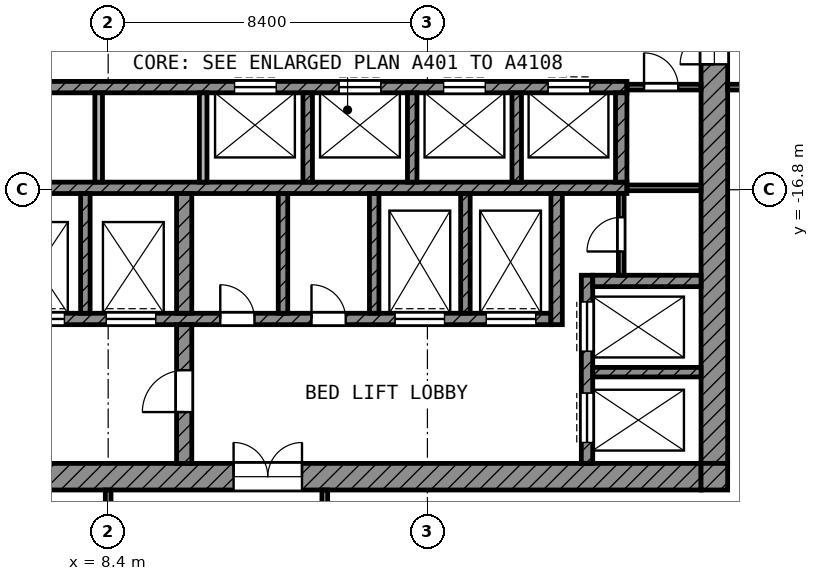
"""IFC4 building model, lengths in metres.
Left out: names, types, materials, properties, quantities, classifications, styles, units other than length and angle.
Written with IfcOpenShell. Run it as: python <this file> out.ifc"""

import sys

from ifc_helpers import new_model, si_unit, direction, frame, frame_2d, origin, place, context, subcontext, project, spatial, rectangle, extrude, element, fill, save


model = new_model("IFC4")
c1 = context("Model", 3, precision=1e-05, world=origin(), true_north=direction((0.0, 1.0)))
c2 = subcontext(c1, "Body", "Model", "MODEL_VIEW")
j1 = project(units=[si_unit("LENGTHUNIT", "METRE"), si_unit("PLANEANGLEUNIT", "RADIAN")], contexts=[c1])
p1 = place(None, origin())
s1 = spatial("IfcSite", under=j1, at=p1, CompositionType="ELEMENT")
p2 = place(p1, origin())
s2 = spatial("IfcBuilding", under=s1, at=p2, CompositionType="ELEMENT")
p3 = place(p2, frame((0.0, 0.0, 281.8)))
s3 = spatial("IfcBuildingStorey", under=s2, at=p3, CompositionType="ELEMENT", Elevation=281.8)
p4 = place(p3, frame((24.35, -24.0, 0.0), z_axis=(0.0, 0.0, 1.0), x_axis=(0.0, 1.0, 0.0)))
e1 = element("IfcWall", 1, at=p4, inside=s3, PredefinedType="SHEAR", context=c2, shape_type="SweptSolid", body=[
    extrude(rectangle(XDim=18.6, YDim=0.7, at=frame_2d((9.3, 0.0))), origin(), (0.0, 0.0, 1.0), 3.6),
])
p5 = place(p4, frame((10.5, 0.0, 0.0)))
e2 = element("IfcOpeningElement", 2, at=p5, cuts=e1, PredefinedType="OPENING", context=c2, shape_type="SweptSolid", body=[
    extrude(rectangle(XDim=1.8, YDim=2.1, at=frame_2d((0.9, 1.05))), frame((0.0, 0.36, 0.0), z_axis=(0.0, -1.0, 0.0), x_axis=(1.0, 0.0, 0.0)), (0.0, 0.0, 1.0), 0.72),
])
p6 = place(p3, frame((5.4, -24.35, 0.0), z_axis=(0.0, 0.0, 1.0), x_axis=(1.0, 0.0, 0.0)))
e3 = element("IfcWall", 3, at=p6, inside=s3, PredefinedType="SHEAR", context=c2, shape_type="SweptSolid", body=[
    extrude(rectangle(XDim=18.6, YDim=0.7, at=frame_2d((9.3, 0.0))), origin(), (0.0, 0.0, 1.0), 3.6),
])
p7 = place(p6, frame((6.3, 0.0, 0.0)))
e4 = element("IfcOpeningElement", 4, at=p7, cuts=e3, PredefinedType="OPENING", context=c2, shape_type="SweptSolid", body=[
    extrude(rectangle(XDim=1.8, YDim=2.1, at=frame_2d((0.9, 1.05))), frame((0.0, 0.36, 0.0), z_axis=(0.0, -1.0, 0.0), x_axis=(1.0, 0.0, 0.0)), (0.0, 0.0, 1.0), 0.72),
])
p8 = place(p3, frame((24.35, -24.7, 0.0), z_axis=(0.0, 0.0, 1.0), x_axis=(0.0, 1.0, 0.0)))
e5 = element("IfcWall", 5, at=p8, inside=s3, PredefinedType="SHEAR", context=c2, shape_type="SweptSolid", body=[
    extrude(rectangle(XDim=0.7, YDim=0.7, at=frame_2d((0.35, 0.0))), origin(), (0.0, 0.0, 1.0), 3.6),
])
p9 = place(p3, frame((5.4, -14.1, 0.0), z_axis=(0.0, 0.0, 1.0), x_axis=(1.0, 0.0, 0.0)))
e6 = element("IfcWall", 6, at=p9, inside=s3, PredefinedType="SHEAR", context=c2, shape_type="SweptSolid", body=[
    extrude(rectangle(XDim=16.65, YDim=0.3, at=frame_2d((8.325, 0.0))), origin(), (0.0, 0.0, 1.0), 3.6),
])
p10 = place(p9, frame((6.325, 0.0, 0.0)))
e7 = element("IfcOpeningElement", 7, at=p10, cuts=e6, PredefinedType="OPENING", context=c2, shape_type="SweptSolid", body=[
    extrude(rectangle(XDim=1.1, YDim=2.1, at=frame_2d((0.55, 1.05))), frame((0.0, 0.16, 0.0), z_axis=(0.0, -1.0, 0.0), x_axis=(1.0, 0.0, 0.0)), (0.0, 0.0, 1.0), 0.32),
])
p11 = place(p9, frame((9.075, 0.0, 0.0)))
e8 = element("IfcOpeningElement", 8, at=p11, cuts=e6, PredefinedType="OPENING", context=c2, shape_type="SweptSolid", body=[
    extrude(rectangle(XDim=1.1, YDim=2.1, at=frame_2d((0.55, 1.05))), frame((0.0, 0.16, 0.0), z_axis=(0.0, -1.0, 0.0), x_axis=(1.0, 0.0, 0.0)), (0.0, 0.0, 1.0), 0.32),
])
p12 = place(p9, frame((11.825, 0.0, 0.0)))
e9 = element("IfcOpeningElement", 9, at=p12, cuts=e6, PredefinedType="OPENING", context=c2, shape_type="SweptSolid", body=[
    extrude(rectangle(XDim=1.1, YDim=2.1, at=frame_2d((0.55, 1.05))), frame((0.0, 0.16, 0.0), z_axis=(0.0, -1.0, 0.0), x_axis=(1.0, 0.0, 0.0)), (0.0, 0.0, 1.0), 0.32),
])
p13 = place(p9, frame((14.575, 0.0, 0.0)))
e10 = element("IfcOpeningElement", 10, at=p13, cuts=e6, PredefinedType="OPENING", context=c2, shape_type="SweptSolid", body=[
    extrude(rectangle(XDim=1.1, YDim=2.1, at=frame_2d((0.55, 1.05))), frame((0.0, 0.16, 0.0), z_axis=(0.0, -1.0, 0.0), x_axis=(1.0, 0.0, 0.0)), (0.0, 0.0, 1.0), 0.32),
])
p14 = place(p3, frame((5.4, -16.75, 0.0), z_axis=(0.0, 0.0, 1.0), x_axis=(1.0, 0.0, 0.0)))
e11 = element("IfcWall", 11, at=p14, inside=s3, PredefinedType="SHEAR", context=c2, shape_type="SweptSolid", body=[
    extrude(rectangle(XDim=16.65, YDim=0.3, at=frame_2d((8.325, 0.0))), origin(), (0.0, 0.0, 1.0), 3.6),
])
p15 = place(p3, frame((5.4, -20.2, 0.0), z_axis=(0.0, 0.0, 1.0), x_axis=(1.0, 0.0, 0.0)))
e12 = element("IfcWall", 12, at=p15, inside=s3, PredefinedType="SHEAR", context=c2, shape_type="SweptSolid", body=[
    extrude(rectangle(XDim=14.65, YDim=0.3, at=frame_2d((7.325, 0.0))), origin(), (0.0, 0.0, 1.0), 3.6),
])
p16 = place(p15, frame((10.55, 0.0, 0.0)))
e13 = element("IfcOpeningElement", 13, at=p16, cuts=e12, PredefinedType="OPENING", context=c2, shape_type="SweptSolid", body=[
    extrude(rectangle(XDim=1.3, YDim=2.1, at=frame_2d((0.65, 1.05))), frame((0.0, 0.16, 0.0), z_axis=(0.0, -1.0, 0.0), x_axis=(1.0, 0.0, 0.0)), (0.0, 0.0, 1.0), 0.32),
])
p17 = place(p15, frame((12.95, 0.0, 0.0)))
e14 = element("IfcOpeningElement", 14, at=p17, cuts=e12, PredefinedType="OPENING", context=c2, shape_type="SweptSolid", body=[
    extrude(rectangle(XDim=1.3, YDim=2.1, at=frame_2d((0.65, 1.05))), frame((0.0, 0.16, 0.0), z_axis=(0.0, -1.0, 0.0), x_axis=(1.0, 0.0, 0.0)), (0.0, 0.0, 1.0), 0.32),
])
p18 = place(p15, frame((0.55, 0.0, 0.0)))
e15 = element("IfcOpeningElement", 15, at=p18, cuts=e12, PredefinedType="OPENING", context=c2, shape_type="SweptSolid", body=[
    extrude(rectangle(XDim=1.3, YDim=2.1, at=frame_2d((0.65, 1.05))), frame((0.0, 0.16, 0.0), z_axis=(0.0, -1.0, 0.0), x_axis=(1.0, 0.0, 0.0)), (0.0, 0.0, 1.0), 0.32),
])
p19 = place(p15, frame((2.95, 0.0, 0.0)))
e16 = element("IfcOpeningElement", 16, at=p19, cuts=e12, PredefinedType="OPENING", context=c2, shape_type="SweptSolid", body=[
    extrude(rectangle(XDim=1.3, YDim=2.1, at=frame_2d((0.65, 1.05))), frame((0.0, 0.16, 0.0), z_axis=(0.0, -1.0, 0.0), x_axis=(1.0, 0.0, 0.0)), (0.0, 0.0, 1.0), 0.32),
])
p20 = place(p15, frame((5.95, 0.0, 0.0)))
e17 = element("IfcOpeningElement", 17, at=p20, cuts=e12, PredefinedType="OPENING", context=c2, shape_type="SweptSolid", body=[
    extrude(rectangle(XDim=0.9, YDim=2.1, at=frame_2d((0.45, 1.05))), frame((0.0, 0.16, 0.0), z_axis=(0.0, -1.0, 0.0), x_axis=(1.0, 0.0, 0.0)), (0.0, 0.0, 1.0), 0.32),
])
p21 = place(p15, frame((8.35, 0.0, 0.0)))
e18 = element("IfcOpeningElement", 18, at=p21, cuts=e12, PredefinedType="OPENING", context=c2, shape_type="SweptSolid", body=[
    extrude(rectangle(XDim=0.9, YDim=2.1, at=frame_2d((0.45, 1.05))), frame((0.0, 0.16, 0.0), z_axis=(0.0, -1.0, 0.0), x_axis=(1.0, 0.0, 0.0)), (0.0, 0.0, 1.0), 0.32),
])
p22 = place(p3, frame((10.4, -24.0, 0.0), z_axis=(0.0, 0.0, 1.0), x_axis=(0.0, 1.0, 0.0)))
e19 = element("IfcWall", 19, at=p22, inside=s3, PredefinedType="SHEAR", context=c2, shape_type="SweptSolid", body=[
    extrude(rectangle(XDim=3.65, YDim=0.4, at=frame_2d((1.825, 0.0))), origin(), (0.0, 0.0, 1.0), 3.6),
])
p23 = place(p22, frame((1.35, 0.0, 0.0)))
e20 = element("IfcOpeningElement", 20, at=p23, cuts=e19, PredefinedType="OPENING", context=c2, shape_type="SweptSolid", body=[
    extrude(rectangle(XDim=1.1, YDim=2.1, at=frame_2d((0.55, 1.05))), frame((0.0, 0.21, 0.0), z_axis=(0.0, -1.0, 0.0), x_axis=(1.0, 0.0, 0.0)), (0.0, 0.0, 1.0), 0.42),
])
p24 = place(p3, frame((10.4, -20.05, 0.0), z_axis=(0.0, 0.0, 1.0), x_axis=(0.0, 1.0, 0.0)))
e21 = element("IfcWall", 21, at=p24, inside=s3, PredefinedType="SHEAR", context=c2, shape_type="SweptSolid", body=[
    extrude(rectangle(XDim=3.15, YDim=0.4, at=frame_2d((1.575, 0.0))), origin(), (0.0, 0.0, 1.0), 3.6),
])
p25 = place(p3, frame((20.2, -20.35, 0.0), z_axis=(0.0, 0.0, 1.0), x_axis=(0.0, 1.0, 0.0)))
e22 = element("IfcWall", 22, at=p25, inside=s3, PredefinedType="SHEAR", context=c2, shape_type="SweptSolid", body=[
    extrude(rectangle(XDim=3.45, YDim=0.3, at=frame_2d((1.725, 0.0))), origin(), (0.0, 0.0, 1.0), 3.6),
])
p26 = place(p3, frame((21.9, -16.6, 0.0), z_axis=(0.0, 0.0, 1.0), x_axis=(0.0, 1.0, 0.0)))
e23 = element("IfcWall", 23, at=p26, inside=s3, PredefinedType="SHEAR", context=c2, shape_type="SweptSolid", body=[
    extrude(rectangle(XDim=2.35, YDim=0.3, at=frame_2d((1.175, 0.0))), origin(), (0.0, 0.0, 1.0), 3.6),
])
p27 = place(p3, frame((21.15, -19.2, 0.0), z_axis=(0.0, 0.0, 1.0), x_axis=(1.0, 0.0, 0.0)))
e24 = element("IfcWall", 24, at=p27, inside=s3, PredefinedType="SHEAR", context=c2, shape_type="SweptSolid", body=[
    extrude(rectangle(XDim=2.85, YDim=0.3, at=frame_2d((1.425, 0.0))), origin(), (0.0, 0.0, 1.0), 3.6),
])
p28 = place(p3, frame((21.0, -24.0, 0.0), z_axis=(0.0, 0.0, 1.0), x_axis=(0.0, 1.0, 0.0)))
e25 = element("IfcWall", 25, at=p28, inside=s3, PredefinedType="SHEAR", context=c2, shape_type="SweptSolid", body=[
    extrude(rectangle(XDim=4.95, YDim=0.3, at=frame_2d((2.475, 0.0))), origin(), (0.0, 0.0, 1.0), 3.6),
])
p29 = place(p28, frame((2.95, 0.0, 0.0)))
e26 = element("IfcOpeningElement", 26, at=p29, cuts=e25, PredefinedType="OPENING", context=c2, shape_type="SweptSolid", body=[
    extrude(rectangle(XDim=1.3, YDim=2.1, at=frame_2d((0.65, 1.05))), frame((0.0, 0.16, 0.0), z_axis=(0.0, -1.0, 0.0), x_axis=(1.0, 0.0, 0.0)), (0.0, 0.0, 1.0), 0.32),
])
p30 = place(p28, frame((0.55, 0.0, 0.0)))
e27 = element("IfcOpeningElement", 27, at=p30, cuts=e25, PredefinedType="OPENING", context=c2, shape_type="SweptSolid", body=[
    extrude(rectangle(XDim=1.3, YDim=2.1, at=frame_2d((0.65, 1.05))), frame((0.0, 0.16, 0.0), z_axis=(0.0, -1.0, 0.0), x_axis=(1.0, 0.0, 0.0)), (0.0, 0.0, 1.0), 0.32),
])
p31 = place(p3, frame((21.15, -21.6, 0.0), z_axis=(0.0, 0.0, 1.0), x_axis=(1.0, 0.0, 0.0)))
e28 = element("IfcWall", 28, at=p31, inside=s3, PredefinedType="SHEAR", context=c2, shape_type="SweptSolid", body=[
    extrude(rectangle(XDim=2.85, YDim=0.25, at=frame_2d((1.425, 0.0))), origin(), (0.0, 0.0, 1.0), 3.6),
])
for number, where, z_axis, x_axis in (
    (29, (7.8, -20.05, 0.0), (0.0, 0.0, 1.0), (0.0, 1.0, 0.0)),
    (30, (13.0, -20.05, 0.0), (0.0, 0.0, 1.0), (0.0, 1.0, 0.0)),
    (31, (15.4, -20.05, 0.0), (0.0, 0.0, 1.0), (0.0, 1.0, 0.0)),
    (32, (17.8, -20.05, 0.0), (0.0, 0.0, 1.0), (0.0, 1.0, 0.0)),
):
    element("IfcWall", number, at=place(p3, frame(where, z_axis=z_axis, x_axis=x_axis)), inside=s3, PredefinedType="SHEAR", context=c2, shape_type="SweptSolid", body=[
        extrude(rectangle(XDim=3.15, YDim=0.25, at=frame_2d((1.575, 0.0))), origin(), (0.0, 0.0, 1.0), 3.6),
    ])
for number, where, z_axis, x_axis in (
    (33, (8.15, -16.6, 0.0), (0.0, 0.0, 1.0), (0.0, 1.0, 0.0)),
    (34, (10.9, -16.6, 0.0), (0.0, 0.0, 1.0), (0.0, 1.0, 0.0)),
):
    element("IfcWall", number, at=place(p3, frame(where, z_axis=z_axis, x_axis=x_axis)), inside=s3, PredefinedType="PARTITIONING", context=c2, shape_type="SweptSolid", body=[
        extrude(rectangle(XDim=2.35, YDim=0.2, at=frame_2d((1.175, 0.0))), origin(), (0.0, 0.0, 1.0), 3.6),
    ])
for number, where, z_axis, x_axis in (
    (35, (13.65, -16.6, 0.0), (0.0, 0.0, 1.0), (0.0, 1.0, 0.0)),
    (36, (16.4, -16.6, 0.0), (0.0, 0.0, 1.0), (0.0, 1.0, 0.0)),
    (37, (19.15, -16.6, 0.0), (0.0, 0.0, 1.0), (0.0, 1.0, 0.0)),
):
    element("IfcWall", number, at=place(p3, frame(where, z_axis=z_axis, x_axis=x_axis)), inside=s3, PredefinedType="SHEAR", context=c2, shape_type="SweptSolid", body=[
        extrude(rectangle(XDim=2.35, YDim=0.25, at=frame_2d((1.175, 0.0))), origin(), (0.0, 0.0, 1.0), 3.6),
    ])
p32 = place(p3, frame((21.9, -19.05, 0.0), z_axis=(0.0, 0.0, 1.0), x_axis=(0.0, 1.0, 0.0)))
e38 = element("IfcWall", 38, at=p32, inside=s3, PredefinedType="PARTITIONING", context=c2, shape_type="SweptSolid", body=[
    extrude(rectangle(XDim=2.15, YDim=0.15, at=frame_2d((1.075, 0.0))), origin(), (0.0, 0.0, 1.0), 3.6),
])
p33 = place(p32, frame((0.625, 0.0, 0.0)))
e39 = element("IfcOpeningElement", 39, at=p33, cuts=e38, PredefinedType="OPENING", context=c2, shape_type="SweptSolid", body=[
    extrude(rectangle(XDim=0.9, YDim=2.1, at=frame_2d((0.45, 1.05))), frame((0.0, 0.085, 0.0), z_axis=(0.0, -1.0, 0.0), x_axis=(1.0, 0.0, 0.0)), (0.0, 0.0, 1.0), 0.17),
])
p34 = place(p3, frame((22.05, -16.75, 0.0), z_axis=(0.0, 0.0, 1.0), x_axis=(1.0, 0.0, 0.0)))
e40 = element("IfcWall", 40, at=p34, inside=s3, PredefinedType="PARTITIONING", context=c2, shape_type="SweptSolid", body=[
    extrude(rectangle(XDim=1.95, YDim=0.15, at=frame_2d((0.975, 0.0))), origin(), (0.0, 0.0, 1.0), 3.6),
])
p35 = place(p3, frame((22.05, -14.1, 0.0), z_axis=(0.0, 0.0, 1.0), x_axis=(1.0, 0.0, 0.0)))
e41 = element("IfcWall", 41, at=p35, inside=s3, PredefinedType="PARTITIONING", context=c2, shape_type="SweptSolid", body=[
    extrude(rectangle(XDim=1.95, YDim=0.15, at=frame_2d((0.975, 0.0))), origin(), (0.0, 0.0, 1.0), 3.6),
])
p36 = place(p35, frame((0.45, 0.0, 0.0)))
e42 = element("IfcOpeningElement", 42, at=p36, cuts=e41, PredefinedType="OPENING", context=c2, shape_type="SweptSolid", body=[
    extrude(rectangle(XDim=0.9, YDim=2.1, at=frame_2d((0.45, 1.05))), frame((0.0, 0.085, 0.0), z_axis=(0.0, -1.0, 0.0), x_axis=(1.0, 0.0, 0.0)), (0.0, 0.0, 1.0), 0.17),
])
p37 = place(p3, frame((24.7, -14.1, 0.0), z_axis=(0.0, 0.0, 1.0), x_axis=(1.0, 0.0, 0.0)))
e43 = element("IfcWall", 43, at=p37, inside=s3, PredefinedType="PARTITIONING", context=c2, shape_type="SweptSolid", body=[
    extrude(rectangle(XDim=4.625, YDim=0.15, at=frame_2d((2.312, 0.0))), origin(), (0.0, 0.0, 1.0), 3.6),
])
p38 = place(p37, frame((2.8, 0.0, 0.0)))
e44 = element("IfcOpeningElement", 44, at=p38, cuts=e43, PredefinedType="OPENING", context=c2, shape_type="SweptSolid", body=[
    extrude(rectangle(XDim=1.0, YDim=2.1, at=frame_2d((0.5, 1.05))), frame((0.0, 0.085, 0.0), z_axis=(0.0, -1.0, 0.0), x_axis=(1.0, 0.0, 0.0)), (0.0, 0.0, 1.0), 0.17),
])
p39 = place(p37, frame((1.4, 0.0, 0.0)))
e45 = element("IfcOpeningElement", 45, at=p39, cuts=e43, PredefinedType="OPENING", context=c2, shape_type="SweptSolid", body=[
    extrude(rectangle(XDim=1.0, YDim=2.1, at=frame_2d((0.5, 1.05))), frame((0.0, 0.085, 0.0), z_axis=(0.0, -1.0, 0.0), x_axis=(1.0, 0.0, 0.0)), (0.0, 0.0, 1.0), 0.17),
])
p40 = place(p3, frame((8.4, -31.957, 0.0), z_axis=(0.0, 0.0, 1.0), x_axis=(0.0, 1.0, 0.0)))
e46 = element("IfcWall", 46, at=p40, inside=s3, PredefinedType="PARTITIONING", context=c2, shape_type="SweptSolid", body=[
    extrude(rectangle(XDim=7.257, YDim=0.15, at=frame_2d((3.628, 0.0))), origin(), (0.0, 0.0, 1.0), 3.6),
])
p41 = place(p40, frame((3.907, 0.0, 0.0)))
e47 = element("IfcOpeningElement", 47, at=p41, cuts=e46, PredefinedType="OPENING", context=c2, shape_type="SweptSolid", body=[
    extrude(rectangle(XDim=0.9, YDim=2.1, at=frame_2d((0.45, 1.05))), frame((0.0, 0.085, 0.0), z_axis=(0.0, -1.0, 0.0), x_axis=(1.0, 0.0, 0.0)), (0.0, 0.0, 1.0), 0.17),
])
p42 = place(p3, frame((14.1, -29.325, 0.0), z_axis=(0.0, 0.0, 1.0), x_axis=(0.0, 1.0, 0.0)))
e48 = element("IfcWall", 48, at=p42, inside=s3, PredefinedType="PARTITIONING", context=c2, shape_type="SweptSolid", body=[
    extrude(rectangle(XDim=4.625, YDim=0.15, at=frame_2d((2.312, 0.0))), origin(), (0.0, 0.0, 1.0), 3.6),
])
p43 = place(p10, origin())
e49 = element("IfcDoor", 49, at=p43, inside=s3, OperationType="DOUBLE_DOOR_SLIDING", PredefinedType="DOOR", context=c2, shape_type="SweptSolid", body=[
    extrude(rectangle(XDim=1.1, YDim=2.1, at=frame_2d((0.55, 1.05))), frame((0.0, 0.025, 0.0), z_axis=(0.0, -1.0, 0.0), x_axis=(1.0, 0.0, 0.0)), (0.0, 0.0, 1.0), 0.05),
])
fill(e7, e49)
p44 = place(p11, origin())
e50 = element("IfcDoor", 50, at=p44, inside=s3, OperationType="DOUBLE_DOOR_SLIDING", PredefinedType="DOOR", context=c2, shape_type="SweptSolid", body=[
    extrude(rectangle(XDim=1.1, YDim=2.1, at=frame_2d((0.55, 1.05))), frame((0.0, 0.025, 0.0), z_axis=(0.0, -1.0, 0.0), x_axis=(1.0, 0.0, 0.0)), (0.0, 0.0, 1.0), 0.05),
])
fill(e8, e50)
p45 = place(p12, origin())
e51 = element("IfcDoor", 51, at=p45, inside=s3, OperationType="DOUBLE_DOOR_SLIDING", PredefinedType="DOOR", context=c2, shape_type="SweptSolid", body=[
    extrude(rectangle(XDim=1.1, YDim=2.1, at=frame_2d((0.55, 1.05))), frame((0.0, 0.025, 0.0), z_axis=(0.0, -1.0, 0.0), x_axis=(1.0, 0.0, 0.0)), (0.0, 0.0, 1.0), 0.05),
])
fill(e9, e51)
p46 = place(p13, origin())
e52 = element("IfcDoor", 52, at=p46, inside=s3, OperationType="DOUBLE_DOOR_SLIDING", PredefinedType="DOOR", context=c2, shape_type="SweptSolid", body=[
    extrude(rectangle(XDim=1.1, YDim=2.1, at=frame_2d((0.55, 1.05))), frame((0.0, 0.025, 0.0), z_axis=(0.0, -1.0, 0.0), x_axis=(1.0, 0.0, 0.0)), (0.0, 0.0, 1.0), 0.05),
])
fill(e10, e52)
p47 = place(p29, origin())
e53 = element("IfcDoor", 53, at=p47, inside=s3, OperationType="DOUBLE_DOOR_SLIDING", PredefinedType="DOOR", context=c2, shape_type="SweptSolid", body=[
    extrude(rectangle(XDim=1.3, YDim=2.1, at=frame_2d((0.65, 1.05))), frame((0.0, 0.025, 0.0), z_axis=(0.0, -1.0, 0.0), x_axis=(1.0, 0.0, 0.0)), (0.0, 0.0, 1.0), 0.05),
])
fill(e26, e53)
p48 = place(p30, origin())
e54 = element("IfcDoor", 54, at=p48, inside=s3, OperationType="DOUBLE_DOOR_SLIDING", PredefinedType="DOOR", context=c2, shape_type="SweptSolid", body=[
    extrude(rectangle(XDim=1.3, YDim=2.1, at=frame_2d((0.65, 1.05))), frame((0.0, 0.025, 0.0), z_axis=(0.0, -1.0, 0.0), x_axis=(1.0, 0.0, 0.0)), (0.0, 0.0, 1.0), 0.05),
])
fill(e27, e54)
p49 = place(p16, origin())
e55 = element("IfcDoor", 55, at=p49, inside=s3, OperationType="DOUBLE_DOOR_SLIDING", PredefinedType="DOOR", context=c2, shape_type="SweptSolid", body=[
    extrude(rectangle(XDim=1.3, YDim=2.1, at=frame_2d((0.65, 1.05))), frame((0.0, 0.025, 0.0), z_axis=(0.0, -1.0, 0.0), x_axis=(1.0, 0.0, 0.0)), (0.0, 0.0, 1.0), 0.05),
])
fill(e13, e55)
p50 = place(p17, origin())
e56 = element("IfcDoor", 56, at=p50, inside=s3, OperationType="DOUBLE_DOOR_SLIDING", PredefinedType="DOOR", context=c2, shape_type="SweptSolid", body=[
    extrude(rectangle(XDim=1.3, YDim=2.1, at=frame_2d((0.65, 1.05))), frame((0.0, 0.025, 0.0), z_axis=(0.0, -1.0, 0.0), x_axis=(1.0, 0.0, 0.0)), (0.0, 0.0, 1.0), 0.05),
])
fill(e14, e56)
p51 = place(p18, origin())
e57 = element("IfcDoor", 57, at=p51, inside=s3, OperationType="DOUBLE_DOOR_SLIDING", PredefinedType="DOOR", context=c2, shape_type="SweptSolid", body=[
    extrude(rectangle(XDim=1.3, YDim=2.1, at=frame_2d((0.65, 1.05))), frame((0.0, 0.025, 0.0), z_axis=(0.0, -1.0, 0.0), x_axis=(1.0, 0.0, 0.0)), (0.0, 0.0, 1.0), 0.05),
])
fill(e15, e57)
p52 = place(p19, origin())
e58 = element("IfcDoor", 58, at=p52, inside=s3, OperationType="DOUBLE_DOOR_SLIDING", PredefinedType="DOOR", context=c2, shape_type="SweptSolid", body=[
    extrude(rectangle(XDim=1.3, YDim=2.1, at=frame_2d((0.65, 1.05))), frame((0.0, 0.025, 0.0), z_axis=(0.0, -1.0, 0.0), x_axis=(1.0, 0.0, 0.0)), (0.0, 0.0, 1.0), 0.05),
])
fill(e16, e58)
p53 = place(p23, origin())
e59 = element("IfcDoor", 59, at=p53, inside=s3, OperationType="SINGLE_SWING_LEFT", PredefinedType="DOOR", context=c2, shape_type="SweptSolid", body=[
    extrude(rectangle(XDim=1.1, YDim=2.1, at=frame_2d((0.55, 1.05))), frame((0.0, 0.025, 0.0), z_axis=(0.0, -1.0, 0.0), x_axis=(1.0, 0.0, 0.0)), (0.0, 0.0, 1.0), 0.05),
])
fill(e20, e59)
p54 = place(p5, origin())
e60 = element("IfcDoor", 60, at=p54, inside=s3, OperationType="DOUBLE_DOOR_SINGLE_SWING", PredefinedType="DOOR", context=c2, shape_type="SweptSolid", body=[
    extrude(rectangle(XDim=1.8, YDim=2.1, at=frame_2d((0.9, 1.05))), frame((0.0, 0.025, 0.0), z_axis=(0.0, -1.0, 0.0), x_axis=(1.0, 0.0, 0.0)), (0.0, 0.0, 1.0), 0.05),
])
fill(e2, e60)
p55 = place(p7, origin())
e61 = element("IfcDoor", 61, at=p55, inside=s3, OperationType="DOUBLE_DOOR_SINGLE_SWING", PredefinedType="DOOR", context=c2, shape_type="SweptSolid", body=[
    extrude(rectangle(XDim=1.8, YDim=2.1, at=frame_2d((0.9, 1.05))), frame((0.0, 0.025, 0.0), z_axis=(0.0, -1.0, 0.0), x_axis=(1.0, 0.0, 0.0)), (0.0, 0.0, 1.0), 0.05),
])
fill(e4, e61)
p56 = place(p36, origin())
e62 = element("IfcDoor", 62, at=p56, inside=s3, OperationType="SINGLE_SWING_LEFT", PredefinedType="DOOR", context=c2, shape_type="SweptSolid", body=[
    extrude(rectangle(XDim=0.9, YDim=2.1, at=frame_2d((0.45, 1.05))), frame((0.0, 0.025, 0.0), z_axis=(0.0, -1.0, 0.0), x_axis=(1.0, 0.0, 0.0)), (0.0, 0.0, 1.0), 0.05),
])
fill(e42, e62)
p57 = place(p33, origin())
e63 = element("IfcDoor", 63, at=p57, inside=s3, OperationType="SINGLE_SWING_LEFT", PredefinedType="DOOR", context=c2, shape_type="SweptSolid", body=[
    extrude(rectangle(XDim=0.9, YDim=2.1, at=frame_2d((0.45, 1.05))), frame((0.0, 0.025, 0.0), z_axis=(0.0, -1.0, 0.0), x_axis=(1.0, 0.0, 0.0)), (0.0, 0.0, 1.0), 0.05),
])
fill(e39, e63)
p58 = place(p20, origin())
e64 = element("IfcDoor", 64, at=p58, inside=s3, OperationType="SINGLE_SWING_LEFT", PredefinedType="DOOR", context=c2, shape_type="SweptSolid", body=[
    extrude(rectangle(XDim=0.9, YDim=2.1, at=frame_2d((0.45, 1.05))), frame((0.0, 0.025, 0.0), z_axis=(0.0, -1.0, 0.0), x_axis=(1.0, 0.0, 0.0)), (0.0, 0.0, 1.0), 0.05),
])
fill(e17, e64)
p59 = place(p21, origin())
e65 = element("IfcDoor", 65, at=p59, inside=s3, OperationType="SINGLE_SWING_LEFT", PredefinedType="DOOR", context=c2, shape_type="SweptSolid", body=[
    extrude(rectangle(XDim=0.9, YDim=2.1, at=frame_2d((0.45, 1.05))), frame((0.0, 0.025, 0.0), z_axis=(0.0, -1.0, 0.0), x_axis=(1.0, 0.0, 0.0)), (0.0, 0.0, 1.0), 0.05),
])
fill(e18, e65)
save(model, sys.argv[1])
